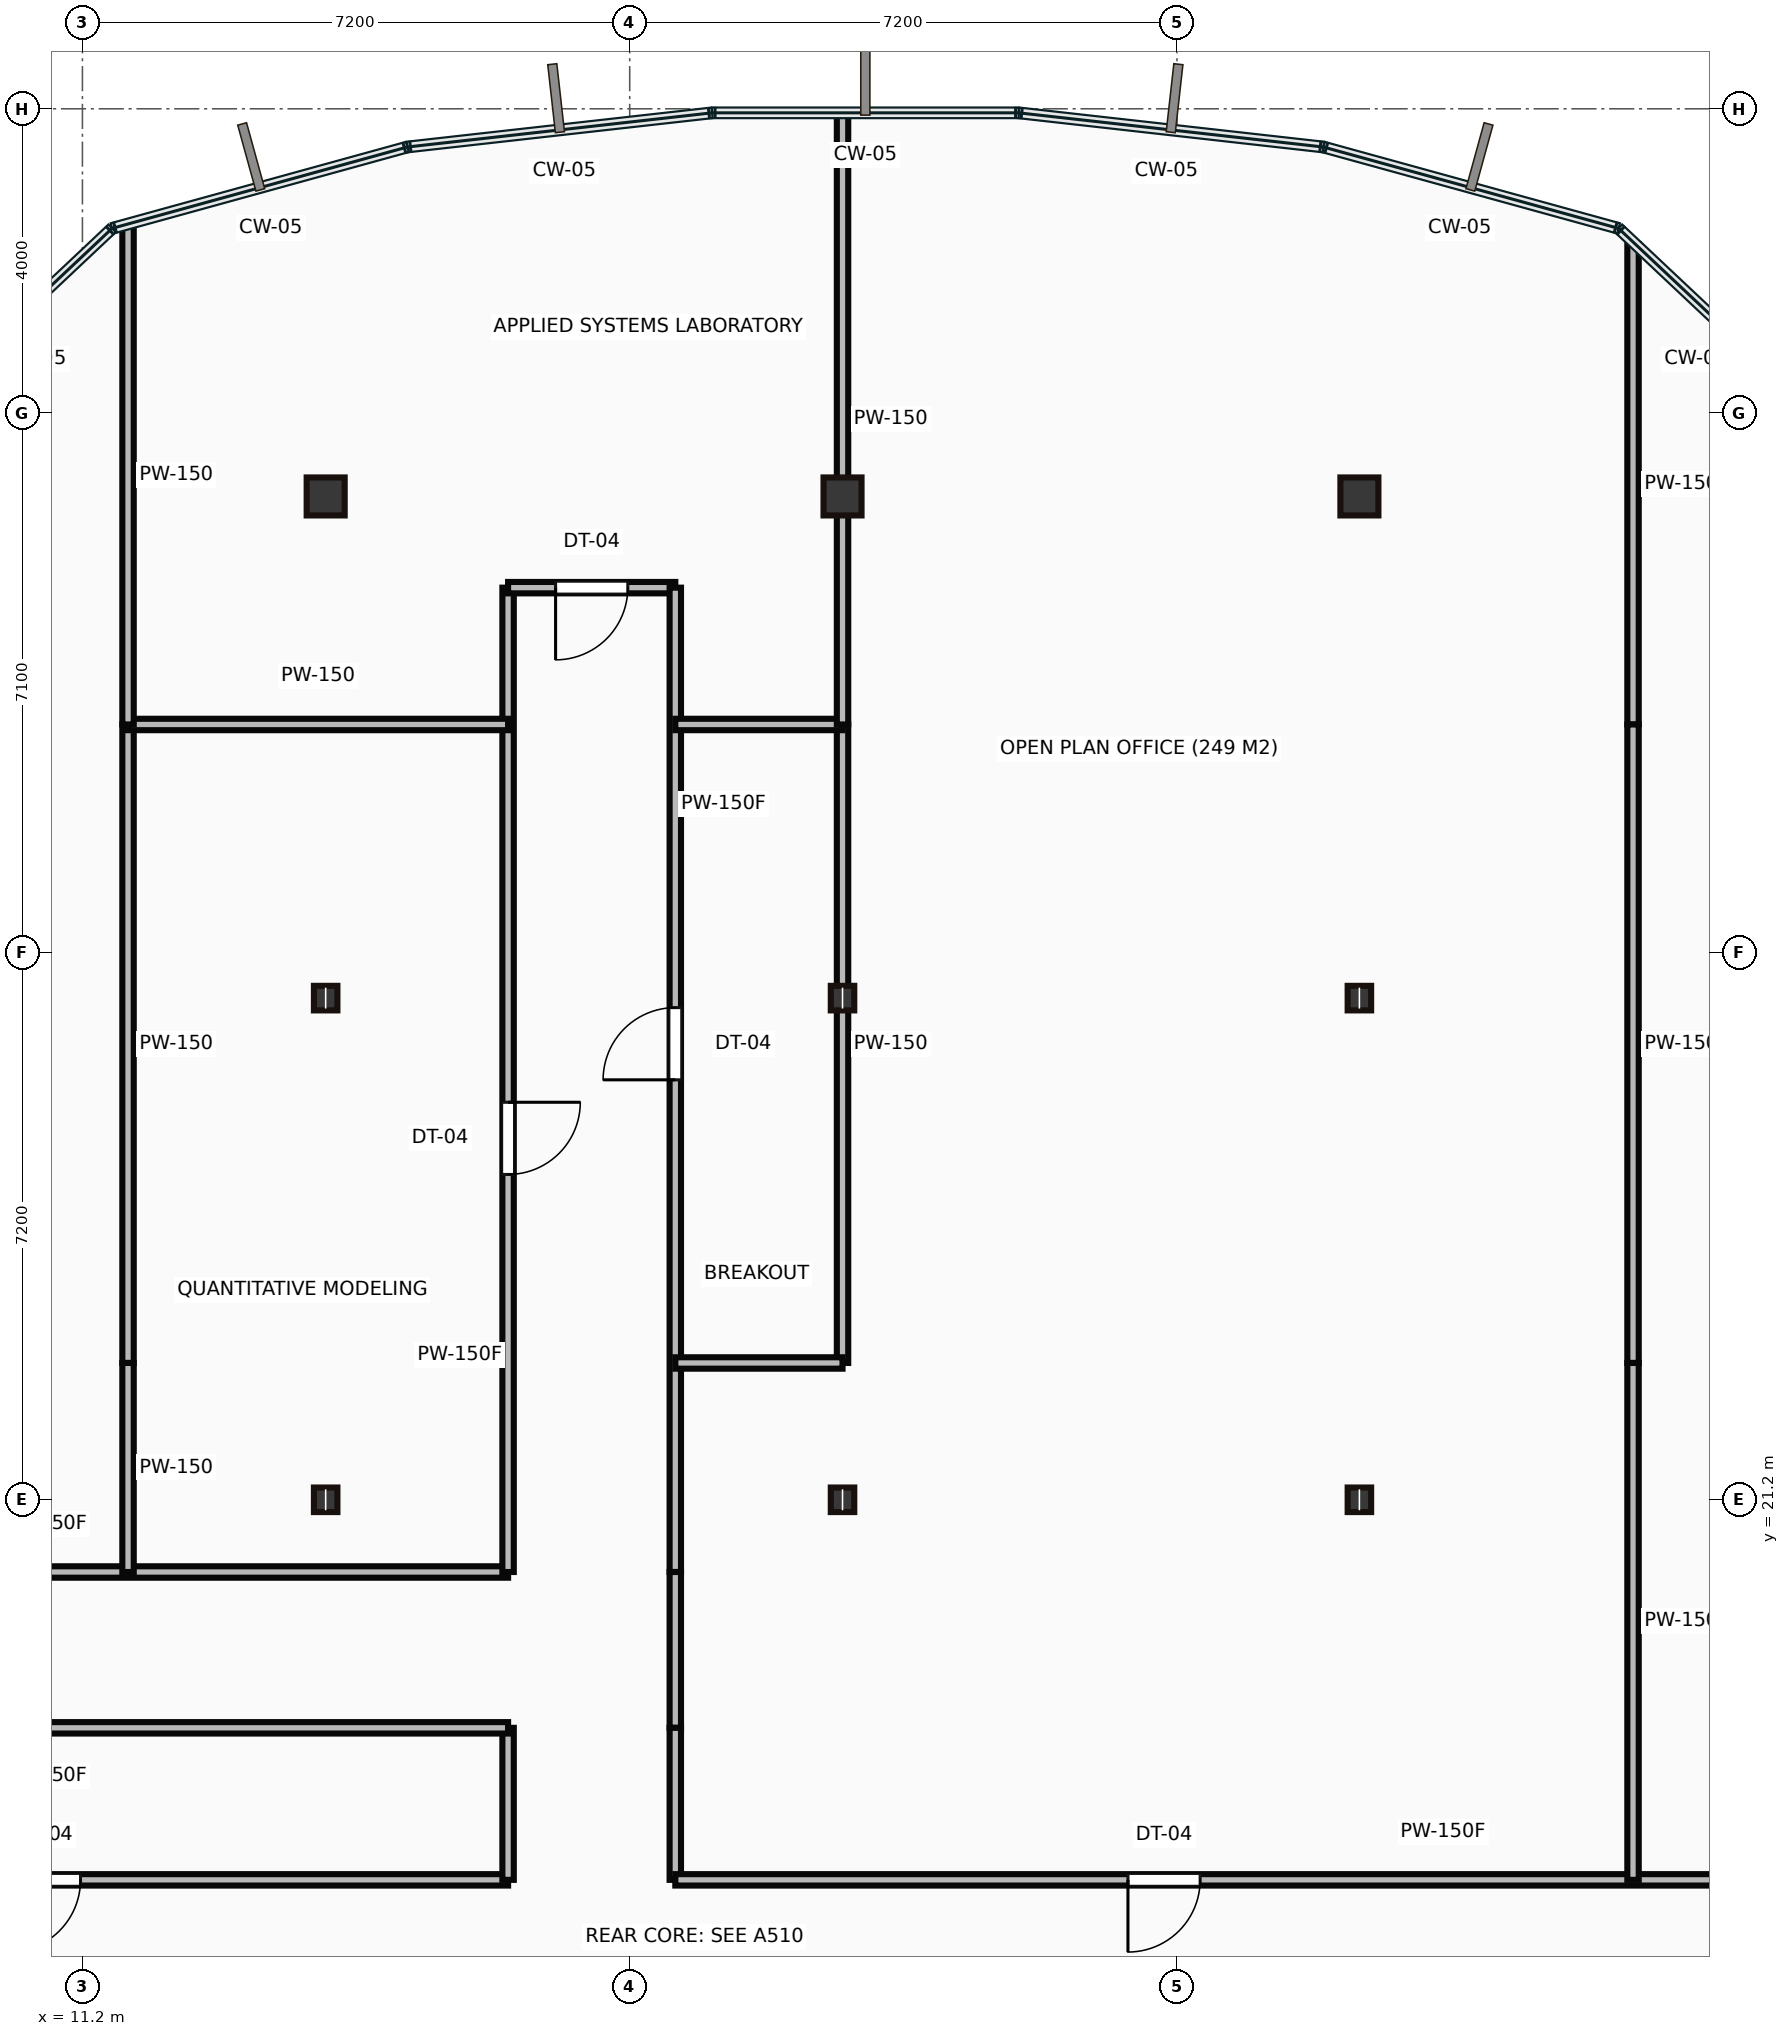
"""IFC4 building model, lengths in metres.
Left out: names, types, materials, properties, quantities, classifications, styles, units other than length and angle.
Written with IfcOpenShell. Run it as: python <this file> out.ifc"""

import sys

from ifc_helpers import new_model, si_unit, direction, frame, frame_2d, origin, origin_2d, place, context, subcontext, project, spatial, rectangle, hollow_rectangle, i_section, extrude, source, transform, mapped, element, fill, save


model = new_model("IFC4")
c1 = context("Model", 3, precision=1e-05, world=origin(), true_north=direction((0.0, 1.0)))
c2 = subcontext(c1, "Body", "Model", "MODEL_VIEW")
j1 = project(units=[si_unit("LENGTHUNIT", "METRE"), si_unit("PLANEANGLEUNIT", "RADIAN")], contexts=[c1])
p1 = place(None, origin())
s1 = spatial("IfcSite", under=j1, at=p1, CompositionType="ELEMENT")
p2 = place(p1, origin())
s2 = spatial("IfcBuilding", under=s1, at=p2, CompositionType="ELEMENT")
p3 = place(p2, frame((0.0, 0.0, 228.75)))
s3 = spatial("IfcBuildingStorey", under=s2, at=p3, CompositionType="ELEMENT", Elevation=228.75)
m1 = source(origin(), c2, "Body", "SweptSolid", [
    extrude(i_section(OverallWidth=0.309, OverallDepth=0.323, WebThickness=0.014, FlangeThickness=0.023, at=origin_2d()), origin(), (0.0, 0.0, 1.0), 3.65),
])
for number, where, z_axis, x_axis in (
    (1, (14.4, 21.2, 0.0), (0.0, 0.0, 1.0), (1.0, 0.0, 0.0)),
    (2, (14.4, 27.8, 0.0), (0.0, 0.0, 1.0), (1.0, 0.0, 0.0)),
):
    element("IfcColumn", number, at=place(p3, frame(where, z_axis=z_axis, x_axis=x_axis)), inside=s3, PredefinedType="COLUMN", context=c2, shape_type="MappedRepresentation", body=[
        mapped(m1, transform((0.0, 0.0, 0.0))),
    ])
m2 = source(origin(), c2, "Body", "SweptSolid", [
    extrude(hollow_rectangle(XDim=0.5, YDim=0.5, WallThickness=0.022, at=origin_2d()), origin(), (0.0, 0.0, 1.0), 3.65),
])
p4 = place(p3, frame((14.4, 34.4, 0.0), z_axis=(0.0, 0.0, 1.0), x_axis=(1.0, 0.0, 0.0)))
e3 = element("IfcColumn", 3, at=p4, inside=s3, PredefinedType="COLUMN", context=c2, shape_type="MappedRepresentation", body=[
    mapped(m2, transform((0.0, 0.0, 0.0))),
])
for number, where, z_axis, x_axis in (
    (4, (21.2, 21.2, 0.0), (0.0, 0.0, 1.0), (1.0, 0.0, 0.0)),
    (5, (21.2, 27.8, 0.0), (0.0, 0.0, 1.0), (1.0, 0.0, 0.0)),
):
    element("IfcColumn", number, at=place(p3, frame(where, z_axis=z_axis, x_axis=x_axis)), inside=s3, PredefinedType="COLUMN", context=c2, shape_type="MappedRepresentation", body=[
        mapped(m1, transform((0.0, 0.0, 0.0))),
    ])
p5 = place(p3, frame((21.2, 34.4, 0.0), z_axis=(0.0, 0.0, 1.0), x_axis=(1.0, 0.0, 0.0)))
e6 = element("IfcColumn", 6, at=p5, inside=s3, PredefinedType="COLUMN", context=c2, shape_type="MappedRepresentation", body=[
    mapped(m2, transform((0.0, 0.0, 0.0))),
])
for number, where, z_axis, x_axis in (
    (7, (28.0, 21.2, 0.0), (0.0, 0.0, 1.0), (1.0, 0.0, 0.0)),
    (8, (28.0, 27.8, 0.0), (0.0, 0.0, 1.0), (1.0, 0.0, 0.0)),
):
    element("IfcColumn", number, at=place(p3, frame(where, z_axis=z_axis, x_axis=x_axis)), inside=s3, PredefinedType="COLUMN", context=c2, shape_type="MappedRepresentation", body=[
        mapped(m1, transform((0.0, 0.0, 0.0))),
    ])
p6 = place(p3, frame((28.0, 34.4, 0.0), z_axis=(0.0, 0.0, 1.0), x_axis=(1.0, 0.0, 0.0)))
e9 = element("IfcColumn", 9, at=p6, inside=s3, PredefinedType="COLUMN", context=c2, shape_type="MappedRepresentation", body=[
    mapped(m2, transform((0.0, 0.0, 0.0))),
])
m3 = source(origin(), c2, "Body", "SweptSolid", [
    extrude(rectangle(XDim=12.2, YDim=0.15, at=frame_2d((6.1, 0.0))), origin(), (0.0, 0.0, 1.0), 3.4),
])
p7 = place(p3, frame((4.6, 16.2, 0.0), z_axis=(0.0, 0.0, 1.0), x_axis=(1.0, 0.0, 0.0)))
e10 = element("IfcWall", 10, at=p7, inside=s3, PredefinedType="PARTITIONING", context=c2, shape_type="MappedRepresentation", body=[
    mapped(m3, transform((0.0, 0.0, 0.0))),
])
p8 = place(p7, frame((5.625, 0.0, 0.0)))
e11 = element("IfcOpeningElement", 11, at=p8, cuts=e10, PredefinedType="OPENING", context=c2, shape_type="SweptSolid", body=[
    extrude(rectangle(XDim=0.95, YDim=2.15, at=frame_2d((0.475, 1.075))), frame((0.0, 0.085, 0.0), z_axis=(0.0, -1.0, 0.0), x_axis=(1.0, 0.0, 0.0)), (0.0, 0.0, 1.0), 0.17),
])
m4 = source(origin(), c2, "Body", "SweptSolid", [
    extrude(rectangle(XDim=2.0, YDim=0.15, at=frame_2d((1.0, 0.0))), origin(), (0.0, 0.0, 1.0), 3.4),
])
p9 = place(p3, frame((16.8, 16.2, 0.0), z_axis=(0.0, 0.0, 1.0), x_axis=(0.0, 1.0, 0.0)))
e12 = element("IfcWall", 12, at=p9, inside=s3, PredefinedType="PARTITIONING", context=c2, shape_type="MappedRepresentation", body=[
    mapped(m4, transform((0.0, 0.0, 0.0))),
])
for number, where, z_axis, x_axis in (
    (13, (16.8, 18.2, 0.0), (0.0, 0.0, 1.0), (-1.0, 0.0, 0.0)),
    (14, (4.6, 20.25, 0.0), (0.0, 0.0, 1.0), (1.0, 0.0, 0.0)),
):
    element("IfcWall", number, at=place(p3, frame(where, z_axis=z_axis, x_axis=x_axis)), inside=s3, PredefinedType="PARTITIONING", context=c2, shape_type="MappedRepresentation", body=[
        mapped(m3, transform((0.0, 0.0, 0.0))),
    ])
m5 = source(origin(), c2, "Body", "SweptSolid", [
    extrude(rectangle(XDim=12.95, YDim=0.15, at=frame_2d((6.475, 0.0))), origin(), (0.0, 0.0, 1.0), 3.4),
])
p10 = place(p3, frame((16.8, 20.25, 0.0), z_axis=(0.0, 0.0, 1.0), x_axis=(0.0, 1.0, 0.0)))
e15 = element("IfcWall", 15, at=p10, inside=s3, PredefinedType="PARTITIONING", context=c2, shape_type="MappedRepresentation", body=[
    mapped(m5, transform((0.0, 0.0, 0.0))),
])
p11 = place(p10, frame((5.23, 0.0, 0.0)))
e16 = element("IfcOpeningElement", 16, at=p11, cuts=e15, PredefinedType="OPENING", context=c2, shape_type="SweptSolid", body=[
    extrude(rectangle(XDim=0.95, YDim=2.15, at=frame_2d((0.475, 1.075))), frame((0.0, 0.085, 0.0), z_axis=(0.0, -1.0, 0.0), x_axis=(1.0, 0.0, 0.0)), (0.0, 0.0, 1.0), 0.17),
])
m6 = source(origin(), c2, "Body", "SweptSolid", [
    extrude(rectangle(XDim=2.2, YDim=0.15, at=frame_2d((1.1, 0.0))), origin(), (0.0, 0.0, 1.0), 3.4),
])
p12 = place(p3, frame((16.8, 33.2, 0.0), z_axis=(0.0, 0.0, 1.0), x_axis=(1.0, 0.0, 0.0)))
e17 = element("IfcWall", 17, at=p12, inside=s3, PredefinedType="PARTITIONING", context=c2, shape_type="MappedRepresentation", body=[
    mapped(m6, transform((0.0, 0.0, 0.0))),
])
p13 = place(p12, frame((0.625, 0.0, 0.0)))
e18 = element("IfcOpeningElement", 18, at=p13, cuts=e17, PredefinedType="OPENING", context=c2, shape_type="SweptSolid", body=[
    extrude(rectangle(XDim=0.95, YDim=2.15, at=frame_2d((0.475, 1.075))), frame((0.0, 0.085, 0.0), z_axis=(0.0, -1.0, 0.0), x_axis=(1.0, 0.0, 0.0)), (0.0, 0.0, 1.0), 0.17),
])
p14 = place(p3, frame((19.0, 33.2, 0.0), z_axis=(0.0, 0.0, 1.0), x_axis=(0.0, -1.0, 0.0)))
e19 = element("IfcWall", 19, at=p14, inside=s3, PredefinedType="PARTITIONING", context=c2, shape_type="MappedRepresentation", body=[
    mapped(m5, transform((0.0, 0.0, 0.0))),
])
p15 = place(p14, frame((5.525, 0.0, 0.0)))
e20 = element("IfcOpeningElement", 20, at=p15, cuts=e19, PredefinedType="OPENING", context=c2, shape_type="SweptSolid", body=[
    extrude(rectangle(XDim=0.95, YDim=2.15, at=frame_2d((0.475, 1.075))), frame((0.0, 0.085, 0.0), z_axis=(0.0, -1.0, 0.0), x_axis=(1.0, 0.0, 0.0)), (0.0, 0.0, 1.0), 0.17),
])
m7 = source(origin(), c2, "Body", "SweptSolid", [
    extrude(rectangle(XDim=2.05, YDim=0.15, at=frame_2d((1.025, 0.0))), origin(), (0.0, 0.0, 1.0), 3.4),
])
p16 = place(p3, frame((19.0, 20.25, 0.0), z_axis=(0.0, 0.0, 1.0), x_axis=(0.0, -1.0, 0.0)))
e21 = element("IfcWall", 21, at=p16, inside=s3, PredefinedType="PARTITIONING", context=c2, shape_type="MappedRepresentation", body=[
    mapped(m7, transform((0.0, 0.0, 0.0))),
])
p17 = place(p3, frame((19.0, 18.2, 0.0), z_axis=(0.0, 0.0, 1.0), x_axis=(0.0, -1.0, 0.0)))
e22 = element("IfcWall", 22, at=p17, inside=s3, PredefinedType="PARTITIONING", context=c2, shape_type="MappedRepresentation", body=[
    mapped(m4, transform((0.0, 0.0, 0.0))),
])
m8 = source(origin(), c2, "Body", "SweptSolid", [
    extrude(rectangle(XDim=20.2, YDim=0.15, at=frame_2d((10.1, 0.0))), origin(), (0.0, 0.0, 1.0), 3.4),
])
p18 = place(p3, frame((19.0, 16.2, 0.0), z_axis=(0.0, 0.0, 1.0), x_axis=(1.0, 0.0, 0.0)))
e23 = element("IfcWall", 23, at=p18, inside=s3, PredefinedType="PARTITIONING", context=c2, shape_type="MappedRepresentation", body=[
    mapped(m8, transform((0.0, 0.0, 0.0))),
])
p19 = place(p18, frame((5.955, 0.0, 0.0)))
e24 = element("IfcOpeningElement", 24, at=p19, cuts=e23, PredefinedType="OPENING", context=c2, shape_type="SweptSolid", body=[
    extrude(rectangle(XDim=0.95, YDim=2.15, at=frame_2d((0.475, 1.075))), frame((0.0, 0.085, 0.0), z_axis=(0.0, -1.0, 0.0), x_axis=(1.0, 0.0, 0.0)), (0.0, 0.0, 1.0), 0.17),
])
p20 = place(p18, frame((15.795, 0.0, 0.0)))
e25 = element("IfcOpeningElement", 25, at=p20, cuts=e23, PredefinedType="OPENING", context=c2, shape_type="SweptSolid", body=[
    extrude(rectangle(XDim=0.95, YDim=2.15, at=frame_2d((0.475, 1.075))), frame((0.0, 0.085, 0.0), z_axis=(0.0, -1.0, 0.0), x_axis=(1.0, 0.0, 0.0)), (0.0, 0.0, 1.0), 0.17),
])
m9 = source(origin(), c2, "Body", "SweptSolid", [
    extrude(rectangle(XDim=8.4, YDim=0.15, at=frame_2d((4.2, 0.0))), origin(), (0.0, 0.0, 1.0), 3.4),
])
p21 = place(p3, frame((11.8, 31.4, 0.0), z_axis=(0.0, 0.0, 1.0), x_axis=(0.0, -1.0, 0.0)))
e26 = element("IfcWall", 26, at=p21, inside=s3, PredefinedType="PARTITIONING", context=c2, shape_type="MappedRepresentation", body=[
    mapped(m9, transform((0.0, 0.0, 0.0))),
])
m10 = source(origin(), c2, "Body", "SweptSolid", [
    extrude(rectangle(XDim=2.75, YDim=0.15, at=frame_2d((1.375, 0.0))), origin(), (0.0, 0.0, 1.0), 3.4),
])
p22 = place(p3, frame((11.8, 23.0, 0.0), z_axis=(0.0, 0.0, 1.0), x_axis=(0.0, -1.0, 0.0)))
e27 = element("IfcWall", 27, at=p22, inside=s3, PredefinedType="PARTITIONING", context=c2, shape_type="MappedRepresentation", body=[
    mapped(m10, transform((0.0, 0.0, 0.0))),
])
m11 = source(origin(), c2, "Body", "SweptSolid", [
    extrude(rectangle(XDim=5.0, YDim=0.15, at=frame_2d((2.5, 0.0))), origin(), (0.0, 0.0, 1.0), 3.4),
])
p23 = place(p3, frame((11.8, 31.4, 0.0), z_axis=(0.0, 0.0, 1.0), x_axis=(1.0, 0.0, 0.0)))
e28 = element("IfcWall", 28, at=p23, inside=s3, PredefinedType="PARTITIONING", context=c2, shape_type="MappedRepresentation", body=[
    mapped(m11, transform((0.0, 0.0, 0.0))),
])
m12 = source(origin(), c2, "Body", "SweptSolid", [
    extrude(rectangle(XDim=6.564, YDim=0.15, at=frame_2d((3.282, 0.0))), origin(), (0.0, 0.0, 1.0), 3.4),
])
p24 = place(p3, frame((11.8, 37.964, 0.0), z_axis=(0.0, 0.0, 1.0), x_axis=(0.0, -1.0, 0.0)))
e29 = element("IfcWall", 29, at=p24, inside=s3, PredefinedType="PARTITIONING", context=c2, shape_type="MappedRepresentation", body=[
    mapped(m12, transform((0.0, 0.0, 0.0))),
])
m13 = source(origin(), c2, "Body", "SweptSolid", [
    extrude(rectangle(XDim=8.4, YDim=0.15, at=frame_2d((4.2, 0.0))), origin(), (0.0, 0.0, 1.0), 2.787),
])
p25 = place(p3, frame((21.2, 31.4, 0.0), z_axis=(0.0, 0.0, 1.0), x_axis=(0.0, -1.0, 0.0)))
e30 = element("IfcWall", 30, at=p25, inside=s3, PredefinedType="PARTITIONING", context=c2, shape_type="MappedRepresentation", body=[
    mapped(m13, transform((0.0, 0.0, 0.0))),
])
for number, where, z_axis, x_axis in (
    (31, (21.2, 23.0, 0.0), (0.0, 0.0, 1.0), (-1.0, 0.0, 0.0)),
    (32, (21.2, 31.4, 0.0), (0.0, 0.0, 1.0), (-1.0, 0.0, 0.0)),
):
    element("IfcWall", number, at=place(p3, frame(where, z_axis=z_axis, x_axis=x_axis)), inside=s3, PredefinedType="PARTITIONING", context=c2, shape_type="MappedRepresentation", body=[
        mapped(m6, transform((0.0, 0.0, 0.0))),
    ])
m14 = source(origin(), c2, "Body", "SweptSolid", [
    extrude(rectangle(XDim=8.027, YDim=0.15, at=frame_2d((4.013, 0.0))), origin(), (0.0, 0.0, 1.0), 2.787),
])
p26 = place(p3, frame((21.2, 39.427, 0.0), z_axis=(0.0, 0.0, 1.0), x_axis=(0.0, -1.0, 0.0)))
e33 = element("IfcWall", 33, at=p26, inside=s3, PredefinedType="PARTITIONING", context=c2, shape_type="MappedRepresentation", body=[
    mapped(m14, transform((0.0, 0.0, 0.0))),
])
m15 = source(origin(), c2, "Body", "SweptSolid", [
    extrude(rectangle(XDim=6.32, YDim=0.15, at=frame_2d((3.16, 0.0))), origin(), (0.0, 0.0, 1.0), 3.4),
])
p27 = place(p3, frame((31.6, 37.72, 0.0), z_axis=(0.0, 0.0, 1.0), x_axis=(0.0, -1.0, 0.0)))
e34 = element("IfcWall", 34, at=p27, inside=s3, PredefinedType="PARTITIONING", context=c2, shape_type="MappedRepresentation", body=[
    mapped(m15, transform((0.0, 0.0, 0.0))),
])
p28 = place(p3, frame((31.6, 31.4, 0.0), z_axis=(0.0, 0.0, 1.0), x_axis=(0.0, -1.0, 0.0)))
e35 = element("IfcWall", 35, at=p28, inside=s3, PredefinedType="PARTITIONING", context=c2, shape_type="MappedRepresentation", body=[
    mapped(m9, transform((0.0, 0.0, 0.0))),
])
m16 = source(origin(), c2, "Body", "SweptSolid", [
    extrude(rectangle(XDim=6.8, YDim=0.15, at=frame_2d((3.4, 0.0))), origin(), (0.0, 0.0, 1.0), 3.4),
])
p29 = place(p3, frame((31.6, 23.0, 0.0), z_axis=(0.0, 0.0, 1.0), x_axis=(0.0, -1.0, 0.0)))
e36 = element("IfcWall", 36, at=p29, inside=s3, PredefinedType="PARTITIONING", context=c2, shape_type="MappedRepresentation", body=[
    mapped(m16, transform((0.0, 0.0, 0.0))),
])
m17 = source(origin(), c2, "Body", "SweptSolid", [
    extrude(rectangle(XDim=0.95, YDim=2.15, at=frame_2d((0.475, 1.075))), frame((0.0, 0.025, 0.0), z_axis=(0.0, -1.0, 0.0), x_axis=(1.0, 0.0, 0.0)), (0.0, 0.0, 1.0), 0.05),
])
p30 = place(p8, origin())
e37 = element("IfcDoor", 37, at=p30, inside=s3, OperationType="SINGLE_SWING_LEFT", PredefinedType="DOOR", context=c2, shape_type="MappedRepresentation", body=[
    mapped(m17, transform((0.0, 0.0, 0.0))),
])
fill(e11, e37)
p31 = place(p11, origin())
e38 = element("IfcDoor", 38, at=p31, inside=s3, OperationType="SINGLE_SWING_RIGHT", PredefinedType="DOOR", context=c2, shape_type="MappedRepresentation", body=[
    mapped(m17, transform((0.0, 0.0, 0.0))),
])
fill(e16, e38)
p32 = place(p13, origin())
e39 = element("IfcDoor", 39, at=p32, inside=s3, OperationType="SINGLE_SWING_LEFT", PredefinedType="DOOR", context=c2, shape_type="MappedRepresentation", body=[
    mapped(m17, transform((0.0, 0.0, 0.0))),
])
fill(e18, e39)
p33 = place(p15, origin())
e40 = element("IfcDoor", 40, at=p33, inside=s3, OperationType="SINGLE_SWING_RIGHT", PredefinedType="DOOR", context=c2, shape_type="MappedRepresentation", body=[
    mapped(m17, transform((0.0, 0.0, 0.0))),
])
fill(e20, e40)
p34 = place(p19, origin())
e41 = element("IfcDoor", 41, at=p34, inside=s3, OperationType="SINGLE_SWING_LEFT", PredefinedType="DOOR", context=c2, shape_type="MappedRepresentation", body=[
    mapped(m17, transform((0.0, 0.0, 0.0))),
])
fill(e24, e41)
save(model, sys.argv[1])
